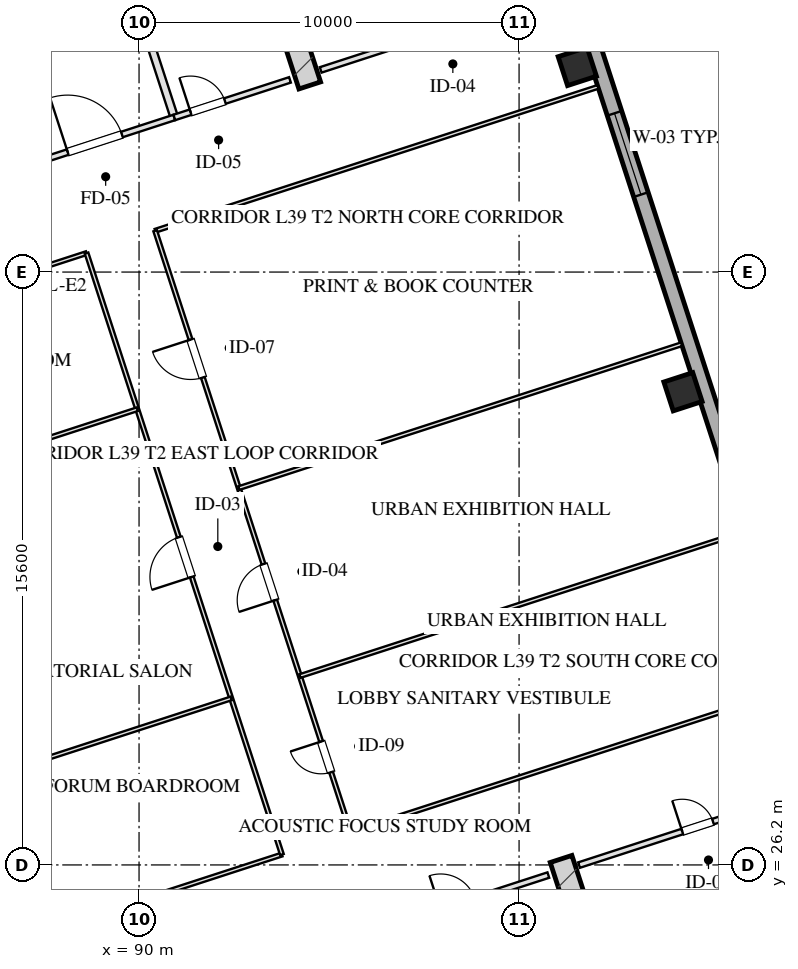
"""IFC4 building model, lengths in metres.
Left out: names, types, materials, properties, quantities, classifications, styles, units other than length and angle.
Written with IfcOpenShell. Run it as: python <this file> out.ifc"""

import sys

from ifc_helpers import new_model, si_unit, direction, frame, frame_2d, origin, origin_2d, place, context, subcontext, project, spatial, rectangle, hollow_rectangle, extrude, element, fill, save


model = new_model("IFC4")
c1 = context("Model", 3, precision=1e-05, world=origin(), true_north=direction((0.0, 1.0)))
c2 = subcontext(c1, "Body", "Model", "MODEL_VIEW")
j1 = project(units=[si_unit("LENGTHUNIT", "METRE"), si_unit("PLANEANGLEUNIT", "RADIAN")], contexts=[c1])
p1 = place(None, origin())
s1 = spatial("IfcSite", under=j1, at=p1, CompositionType="ELEMENT")
p2 = place(p1, origin())
s2 = spatial("IfcBuilding", under=s1, at=p2, CompositionType="ELEMENT")
p3 = place(p2, frame((0.0, 0.0, 149.5)))
s3 = spatial("IfcBuildingStorey", under=s2, at=p3, CompositionType="ELEMENT", Elevation=149.5)
for number, where, z_axis, x_axis in (
    (1, (101.105, 26.358, 0.0), (0.0, 0.0, 1.0), (0.309, -0.951, 0.0)),
    (2, (94.492, 46.71, 0.0), (0.0, 0.0, 1.0), (-0.309, 0.951, 0.0)),
):
    element("IfcWall", number, at=place(p3, frame(where, z_axis=z_axis, x_axis=x_axis)), inside=s3, PredefinedType="SHEAR", context=c2, shape_type="SweptSolid", body=[
        extrude(rectangle(XDim=9.48, YDim=0.6, at=frame_2d((4.74, 0.0))), origin(), (0.0, 0.0, 1.0), 3.45),
    ])
for number, where, z_axis, x_axis in (
    (3, (104.313, 38.651, 0.0), (0.0, 0.0, 1.0), (0.951, 0.309, 0.0)),
    (4, (101.532, 47.21, 0.0), (0.0, 0.0, 1.0), (0.951, 0.309, 0.0)),
):
    element("IfcColumn", number, at=place(p3, frame(where, z_axis=z_axis, x_axis=x_axis)), inside=s3, PredefinedType="COLUMN", context=c2, shape_type="SweptSolid", body=[
        extrude(hollow_rectangle(XDim=0.8, YDim=0.8, WallThickness=0.028, at=origin_2d()), origin(), (0.0, 0.0, 1.0), 3.451),
    ])
p4 = place(p3, frame((98.224, 59.173, 0.0), z_axis=(0.0, 0.0, 1.0), x_axis=(0.309014228706, -0.951057414911, 0.0)))
e5 = element("IfcWall", 5, at=p4, inside=s3, PredefinedType="SOLIDWALL", context=c2, shape_type="SweptSolid", body=[
    extrude(rectangle(XDim=42.8, YDim=0.4, at=frame_2d((21.4, 0.0))), origin(), (0.0, 0.0, 1.0), 2.61),
])
p5 = place(p4, frame((26.675, 0.0, 0.75)))
e6 = element("IfcOpeningElement", 6, at=p5, cuts=e5, PredefinedType="OPENING", context=c2, shape_type="SweptSolid", body=[
    extrude(rectangle(XDim=2.25, YDim=1.46, at=frame_2d((1.125, 0.73))), frame((0.0, 0.21, 0.0), z_axis=(0.0, -1.0, 0.0), x_axis=(1.0, 0.0, 0.0)), (0.0, 0.0, 1.0), 0.42),
])
p6 = place(p4, frame((13.875, 0.0, 0.75)))
e7 = element("IfcOpeningElement", 7, at=p6, cuts=e5, PredefinedType="OPENING", context=c2, shape_type="SweptSolid", body=[
    extrude(rectangle(XDim=2.25, YDim=1.46, at=frame_2d((1.125, 0.73))), frame((0.0, 0.21, 0.0), z_axis=(0.0, -1.0, 0.0), x_axis=(1.0, 0.0, 0.0)), (0.0, 0.0, 1.0), 0.42),
])
p7 = place(p3, frame((97.727, 24.944, 0.0), z_axis=(0.0, 0.0, 1.0), x_axis=(0.951036872128, 0.309077446369, 0.0)))
e8 = element("IfcWall", 8, at=p7, inside=s3, PredefinedType="PARTITIONING", context=c2, shape_type="SweptSolid", body=[
    extrude(rectangle(XDim=3.2, YDim=0.15, at=frame_2d((1.6, 0.0))), origin(), (0.0, 0.0, 1.0), 3.175),
])
p8 = place(p7, frame((0.22, 0.0, 0.0)))
e9 = element("IfcOpeningElement", 9, at=p8, cuts=e8, PredefinedType="OPENING", context=c2, shape_type="SweptSolid", body=[
    extrude(rectangle(XDim=0.95, YDim=2.05, at=frame_2d((0.475, 1.025))), frame((0.0, 0.085, 0.0), z_axis=(0.0, -1.0, 0.0), x_axis=(1.0, 0.0, 0.0)), (0.0, 0.0, 1.0), 0.17),
])
p9 = place(p3, frame((90.928, 45.868, 0.0), z_axis=(0.0, 0.0, 1.0), x_axis=(-0.309042196757, 0.951048327176, 0.0)))
e10 = element("IfcWall", 10, at=p9, inside=s3, PredefinedType="PARTITIONING", context=c2, shape_type="SweptSolid", body=[
    extrude(rectangle(XDim=8.43, YDim=0.2, at=frame_2d((4.215, 0.0))), origin(), (0.0, 0.0, 1.0), 3.175),
])
p10 = place(p3, frame((86.743, 44.508, 0.0), z_axis=(0.0, 0.0, 1.0), x_axis=(0.951063829732, 0.308994485023, 0.0)))
e11 = element("IfcWall", 11, at=p10, inside=s3, PredefinedType="PARTITIONING", context=c2, shape_type="SweptSolid", body=[
    extrude(rectangle(XDim=4.4, YDim=0.15, at=frame_2d((2.2, 0.0))), origin(), (0.0, 0.0, 1.0), 3.175),
])
p11 = place(p10, frame((1.45, 0.0, 0.0)))
e12 = element("IfcOpeningElement", 12, at=p11, cuts=e11, PredefinedType="OPENING", context=c2, shape_type="SweptSolid", body=[
    extrude(rectangle(XDim=1.5, YDim=2.05, at=frame_2d((0.75, 1.025))), frame((0.0, 0.085, 0.0), z_axis=(0.0, -1.0, 0.0), x_axis=(1.0, 0.0, 0.0)), (0.0, 0.0, 1.0), 0.17),
])
p12 = place(p3, frame((85.718, 47.666, 0.0), z_axis=(0.0, 0.0, 1.0), x_axis=(0.951058531764, 0.30901079133, 0.0)))
e13 = element("IfcWall", 13, at=p12, inside=s3, PredefinedType="PARTITIONING", context=c2, shape_type="SweptSolid", body=[
    extrude(rectangle(XDim=4.4, YDim=0.2, at=frame_2d((2.2, 0.0))), origin(), (0.0, 0.0, 1.0), 3.175),
])
p13 = place(p12, frame((0.45, 0.0, 0.0)))
e14 = element("IfcOpeningElement", 14, at=p13, cuts=e13, PredefinedType="OPENING", context=c2, shape_type="SweptSolid", body=[
    extrude(rectangle(XDim=1.1, YDim=2.05, at=frame_2d((0.55, 1.025))), frame((0.0, 0.11, 0.0), z_axis=(0.0, -1.0, 0.0), x_axis=(1.0, 0.0, 0.0)), (0.0, 0.0, 1.0), 0.22),
])
p14 = place(p12, frame((2.55, 0.0, 0.0)))
e15 = element("IfcOpeningElement", 15, at=p14, cuts=e13, PredefinedType="OPENING", context=c2, shape_type="SweptSolid", body=[
    extrude(rectangle(XDim=1.1, YDim=2.05, at=frame_2d((0.55, 1.025))), frame((0.0, 0.11, 0.0), z_axis=(0.0, -1.0, 0.0), x_axis=(1.0, 0.0, 0.0)), (0.0, 0.0, 1.0), 0.22),
])
p15 = place(p3, frame((90.928, 45.868, 0.0), z_axis=(0.0, 0.0, 1.0), x_axis=(0.951059297078, 0.309008435874, 0.0)))
e16 = element("IfcWall", 16, at=p15, inside=s3, PredefinedType="PARTITIONING", context=c2, shape_type="SweptSolid", body=[
    extrude(rectangle(XDim=3.2, YDim=0.15, at=frame_2d((1.6, 0.0))), origin(), (0.0, 0.0, 1.0), 3.175),
])
p16 = place(p15, frame((0.45, 0.0, 0.0)))
e17 = element("IfcOpeningElement", 17, at=p16, cuts=e16, PredefinedType="OPENING", context=c2, shape_type="SweptSolid", body=[
    extrude(rectangle(XDim=0.95, YDim=2.05, at=frame_2d((0.475, 1.025))), frame((0.0, 0.085, 0.0), z_axis=(0.0, -1.0, 0.0), x_axis=(1.0, 0.0, 0.0)), (0.0, 0.0, 1.0), 0.17),
])
p17 = place(p3, frame((101.578, 26.196, 0.0), z_axis=(0.0, 0.0, 1.0), x_axis=(0.951064934653, 0.308991084134, 0.0)))
e18 = element("IfcWall", 18, at=p17, inside=s3, PredefinedType="PARTITIONING", context=c2, shape_type="SweptSolid", body=[
    extrude(rectangle(XDim=6.8, YDim=0.15, at=frame_2d((3.4, 0.0))), origin(), (0.0, 0.0, 1.0), 3.175),
])
p18 = place(p17, frame((2.856, 0.0, 0.0)))
e19 = element("IfcOpeningElement", 19, at=p18, cuts=e18, PredefinedType="OPENING", context=c2, shape_type="SweptSolid", body=[
    extrude(rectangle(XDim=0.85, YDim=2.05, at=frame_2d((0.425, 1.025))), frame((0.0, 0.085, 0.0), z_axis=(0.0, -1.0, 0.0), x_axis=(1.0, 0.0, 0.0)), (0.0, 0.0, 1.0), 0.17),
])
p19 = place(p3, frame((94.78, 47.119, 0.0), z_axis=(0.0, 0.0, 1.0), x_axis=(0.951057811516, 0.309013008068, 0.0)))
e20 = element("IfcWall", 20, at=p19, inside=s3, PredefinedType="PARTITIONING", context=c2, shape_type="SweptSolid", body=[
    extrude(rectangle(XDim=6.8, YDim=0.15, at=frame_2d((3.4, 0.0))), origin(), (0.0, 0.0, 1.0), 3.175),
])
p20 = place(p19, frame((2.856, 0.0, 0.0)))
e21 = element("IfcOpeningElement", 21, at=p20, cuts=e20, PredefinedType="OPENING", context=c2, shape_type="SweptSolid", body=[
    extrude(rectangle(XDim=1.0, YDim=2.05, at=frame_2d((0.5, 1.025))), frame((0.0, 0.085, 0.0), z_axis=(0.0, -1.0, 0.0), x_axis=(1.0, 0.0, 0.0)), (0.0, 0.0, 1.0), 0.17),
])
p21 = place(p3, frame((85.248, 23.708, 0.0), z_axis=(0.0, 0.0, 1.0), x_axis=(0.951059123431, 0.309008970321, 0.0)))
e22 = element("IfcWall", 22, at=p21, inside=s3, PredefinedType="MOVABLE", context=c2, shape_type="SweptSolid", body=[
    extrude(rectangle(XDim=8.95, YDim=0.1, at=frame_2d((4.475, 0.0))), origin(), (0.0, 0.0, 1.0), 3.175),
])
p22 = place(p3, frame((95.567, 27.061, 0.0), z_axis=(0.0, 0.0, 1.0), x_axis=(0.9510516424, 0.30903199428, 0.0)))
e23 = element("IfcWall", 23, at=p22, inside=s3, PredefinedType="MOVABLE", context=c2, shape_type="SweptSolid", body=[
    extrude(rectangle(XDim=12.25, YDim=0.1, at=frame_2d((6.125, 0.0))), origin(), (0.0, 0.0, 1.0), 3.175),
])
p23 = place(p3, frame((80.106, 39.533, 0.0), z_axis=(0.0, 0.0, 1.0), x_axis=(0.951059123431, 0.309008970321, 0.0)))
e24 = element("IfcWall", 24, at=p23, inside=s3, PredefinedType="MOVABLE", context=c2, shape_type="SweptSolid", body=[
    extrude(rectangle(XDim=8.95, YDim=0.1, at=frame_2d((4.475, 0.0))), origin(), (0.0, 0.0, 1.0), 3.175),
])
p24 = place(p3, frame((90.425, 42.886, 0.0), z_axis=(0.0, 0.0, 1.0), x_axis=(0.95105749975, 0.309013967595, 0.0)))
e25 = element("IfcWall", 25, at=p24, inside=s3, PredefinedType="MOVABLE", context=c2, shape_type="SweptSolid", body=[
    extrude(rectangle(XDim=12.25, YDim=0.1, at=frame_2d((6.125, 0.0))), origin(), (0.0, 0.0, 1.0), 3.175),
])
p25 = place(p3, frame((93.76, 26.473, 0.0), z_axis=(0.0, 0.0, 1.0), x_axis=(-0.309004459387, 0.951060589068, 0.0)))
e26 = element("IfcWall", 26, at=p25, inside=s3, PredefinedType="MOVABLE", context=c2, shape_type="SweptSolid", body=[
    extrude(rectangle(XDim=16.64, YDim=0.1, at=frame_2d((8.32, 0.0))), origin(), (0.0, 0.0, 1.0), 3.175),
])
p26 = place(p25, frame((7.68, 0.0, 0.0)))
e27 = element("IfcOpeningElement", 27, at=p26, cuts=e26, PredefinedType="OPENING", context=c2, shape_type="SweptSolid", body=[
    extrude(rectangle(XDim=1.1, YDim=2.05, at=frame_2d((0.55, 1.025))), frame((0.0, 0.06, 0.0), z_axis=(0.0, -1.0, 0.0), x_axis=(1.0, 0.0, 0.0)), (0.0, 0.0, 1.0), 0.12),
])
p27 = place(p3, frame((95.567, 27.061, 0.0), z_axis=(0.0, 0.0, 1.0), x_axis=(-0.30901773025, 0.951056277195, 0.0)))
e28 = element("IfcWall", 28, at=p27, inside=s3, PredefinedType="MOVABLE", context=c2, shape_type="SweptSolid", body=[
    extrude(rectangle(XDim=16.64, YDim=0.1, at=frame_2d((8.32, 0.0))), origin(), (0.0, 0.0, 1.0), 3.175),
])
p28 = place(p27, frame((1.66, 0.0, 0.0)))
e29 = element("IfcOpeningElement", 29, at=p28, cuts=e28, PredefinedType="OPENING", context=c2, shape_type="SweptSolid", body=[
    extrude(rectangle(XDim=0.85, YDim=2.05, at=frame_2d((0.425, 1.025))), frame((0.0, 0.06, 0.0), z_axis=(0.0, -1.0, 0.0), x_axis=(1.0, 0.0, 0.0)), (0.0, 0.0, 1.0), 0.12),
])
p29 = place(p27, frame((6.42, 0.0, 0.0)))
e30 = element("IfcOpeningElement", 30, at=p29, cuts=e28, PredefinedType="OPENING", context=c2, shape_type="SweptSolid", body=[
    extrude(rectangle(XDim=1.0, YDim=2.05, at=frame_2d((0.5, 1.025))), frame((0.0, 0.06, 0.0), z_axis=(0.0, -1.0, 0.0), x_axis=(1.0, 0.0, 0.0)), (0.0, 0.0, 1.0), 0.12),
])
p30 = place(p27, frame((12.58, 0.0, 0.0)))
e31 = element("IfcOpeningElement", 31, at=p30, cuts=e28, PredefinedType="OPENING", context=c2, shape_type="SweptSolid", body=[
    extrude(rectangle(XDim=1.05, YDim=2.05, at=frame_2d((0.525, 1.025))), frame((0.0, 0.06, 0.0), z_axis=(0.0, -1.0, 0.0), x_axis=(1.0, 0.0, 0.0)), (0.0, 0.0, 1.0), 0.12),
])
p31 = place(p3, frame((83.913, 27.816, 0.0), z_axis=(0.0, 0.0, 1.0), x_axis=(0.951059123431, 0.309008970321, 0.0)))
e32 = element("IfcWall", 32, at=p31, inside=s3, PredefinedType="MOVABLE", context=c2, shape_type="SweptSolid", body=[
    extrude(rectangle(XDim=8.95, YDim=0.1, at=frame_2d((4.475, 0.0))), origin(), (0.0, 0.0, 1.0), 3.175),
])
p32 = place(p3, frame((81.441, 35.425, 0.0), z_axis=(0.0, 0.0, 1.0), x_axis=(0.951056518616, 0.309016987233, 0.0)))
e33 = element("IfcWall", 33, at=p32, inside=s3, PredefinedType="MOVABLE", context=c2, shape_type="SweptSolid", body=[
    extrude(rectangle(XDim=8.95, YDim=0.1, at=frame_2d((4.475, 0.0))), origin(), (0.0, 0.0, 1.0), 3.175),
])
for number, where, z_axis, x_axis in (
    (34, (94.232, 31.169, 0.0), (0.0, 0.0, 1.0), (0.951, 0.309, 0.0)),
    (35, (92.625, 36.115, 0.0), (0.0, 0.0, 1.0), (0.951, 0.309, 0.0)),
):
    element("IfcWall", number, at=place(p3, frame(where, z_axis=z_axis, x_axis=x_axis)), inside=s3, PredefinedType="MOVABLE", context=c2, shape_type="SweptSolid", body=[
        extrude(rectangle(XDim=12.25, YDim=0.1, at=frame_2d((6.125, 0.0))), origin(), (0.0, 0.0, 1.0), 3.175),
    ])
p33 = place(p6, origin())
e36 = element("IfcWindow", 36, at=p33, inside=s3, PartitioningType="TRIPLE_PANEL_VERTICAL", PredefinedType="WINDOW", context=c2, shape_type="SweptSolid", body=[
    extrude(rectangle(XDim=2.25, YDim=1.46, at=frame_2d((1.125, 0.73))), frame((0.0, 0.03, 0.0), z_axis=(0.0, -1.0, 0.0), x_axis=(1.0, 0.0, 0.0)), (0.0, 0.0, 1.0), 0.06),
])
fill(e7, e36)
p34 = place(p11, origin())
e37 = element("IfcDoor", 37, at=p34, inside=s3, OperationType="SINGLE_SWING_LEFT", PredefinedType="DOOR", context=c2, shape_type="SweptSolid", body=[
    extrude(rectangle(XDim=1.5, YDim=2.05, at=frame_2d((0.75, 1.025))), frame((0.0, 0.025, 0.0), z_axis=(0.0, -1.0, 0.0), x_axis=(1.0, 0.0, 0.0)), (0.0, 0.0, 1.0), 0.05),
])
fill(e12, e37)
p35 = place(p16, origin())
e38 = element("IfcDoor", 38, at=p35, inside=s3, OperationType="SINGLE_SWING_LEFT", PredefinedType="DOOR", context=c2, shape_type="SweptSolid", body=[
    extrude(rectangle(XDim=0.95, YDim=2.05, at=frame_2d((0.475, 1.025))), frame((0.0, 0.025, 0.0), z_axis=(0.0, -1.0, 0.0), x_axis=(1.0, 0.0, 0.0)), (0.0, 0.0, 1.0), 0.05),
])
fill(e17, e38)
p36 = place(p18, origin())
e39 = element("IfcDoor", 39, at=p36, inside=s3, OperationType="SINGLE_SWING_LEFT", PredefinedType="DOOR", context=c2, shape_type="SweptSolid", body=[
    extrude(rectangle(XDim=0.85, YDim=2.05, at=frame_2d((0.425, 1.025))), frame((0.0, 0.025, 0.0), z_axis=(0.0, -1.0, 0.0), x_axis=(1.0, 0.0, 0.0)), (0.0, 0.0, 1.0), 0.05),
])
fill(e19, e39)
p37 = place(p26, origin())
e40 = element("IfcDoor", 40, at=p37, inside=s3, OperationType="SINGLE_SWING_LEFT", PredefinedType="DOOR", context=c2, shape_type="SweptSolid", body=[
    extrude(rectangle(XDim=1.1, YDim=2.05, at=frame_2d((0.55, 1.025))), frame((0.0, 0.025, 0.0), z_axis=(0.0, -1.0, 0.0), x_axis=(1.0, 0.0, 0.0)), (0.0, 0.0, 1.0), 0.05),
])
fill(e27, e40)
p38 = place(p28, origin())
e41 = element("IfcDoor", 41, at=p38, inside=s3, OperationType="SINGLE_SWING_RIGHT", PredefinedType="DOOR", context=c2, shape_type="SweptSolid", body=[
    extrude(rectangle(XDim=0.85, YDim=2.05, at=frame_2d((0.425, 1.025))), frame((0.0, 0.025, 0.0), z_axis=(0.0, -1.0, 0.0), x_axis=(1.0, 0.0, 0.0)), (0.0, 0.0, 1.0), 0.05),
])
fill(e29, e41)
p39 = place(p29, origin())
e42 = element("IfcDoor", 42, at=p39, inside=s3, OperationType="SINGLE_SWING_LEFT", PredefinedType="DOOR", context=c2, shape_type="SweptSolid", body=[
    extrude(rectangle(XDim=1.0, YDim=2.05, at=frame_2d((0.5, 1.025))), frame((0.0, 0.025, 0.0), z_axis=(0.0, -1.0, 0.0), x_axis=(1.0, 0.0, 0.0)), (0.0, 0.0, 1.0), 0.05),
])
fill(e30, e42)
p40 = place(p30, origin())
e43 = element("IfcDoor", 43, at=p40, inside=s3, OperationType="SINGLE_SWING_RIGHT", PredefinedType="DOOR", context=c2, shape_type="SweptSolid", body=[
    extrude(rectangle(XDim=1.05, YDim=2.05, at=frame_2d((0.525, 1.025))), frame((0.0, 0.025, 0.0), z_axis=(0.0, -1.0, 0.0), x_axis=(1.0, 0.0, 0.0)), (0.0, 0.0, 1.0), 0.05),
])
fill(e31, e43)
save(model, sys.argv[1])
